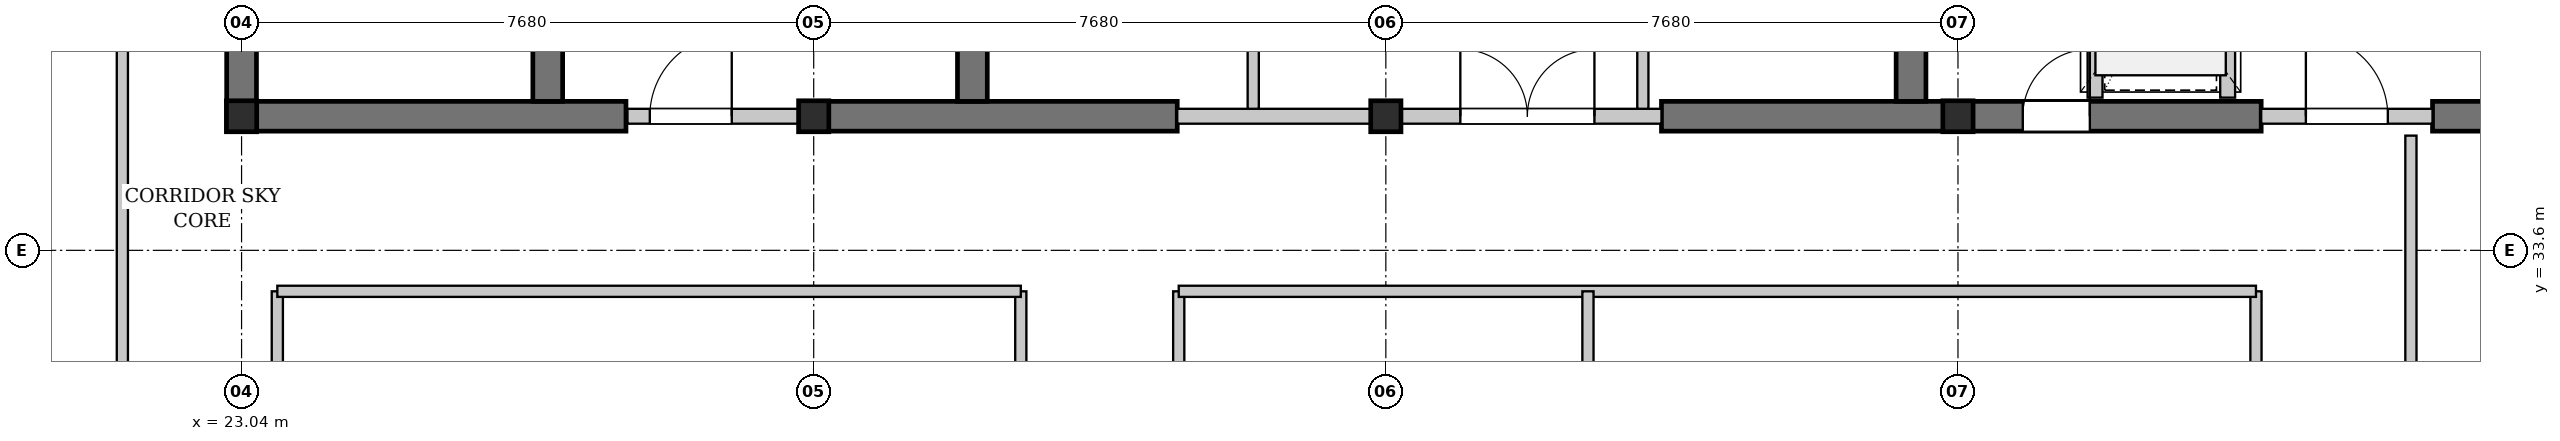
"""IFC4 building model, lengths in metres.
Left out: names, types, materials, properties, quantities, classifications, styles, units other than length and angle.
Written with IfcOpenShell. Run it as: python <this file> out.ifc"""

import sys

from ifc_helpers import new_model, si_unit, direction, frame, frame_2d, origin, origin_2d, place, context, subcontext, project, spatial, rectangle, i_section, extrude, element, fill, save


model = new_model("IFC4")
c1 = context("Model", 3, precision=1e-05, world=origin(), true_north=direction((0.0, 1.0)))
c2 = subcontext(c1, "Body", "Model", "MODEL_VIEW")
j1 = project(units=[si_unit("LENGTHUNIT", "METRE"), si_unit("PLANEANGLEUNIT", "RADIAN")], contexts=[c1])
p1 = place(None, origin())
s1 = spatial("IfcSite", under=j1, at=p1, CompositionType="ELEMENT")
p2 = place(p1, origin())
s2 = spatial("IfcBuilding", under=s1, at=p2, CompositionType="ELEMENT")
p3 = place(p2, frame((0.0, 0.0, 282.9)))
s3 = spatial("IfcBuildingStorey", under=s2, at=p3, CompositionType="ELEMENT", Elevation=282.9)
p4 = place(p3, frame((22.84, 35.4, 0.0), z_axis=(0.0, 0.0, 1.0), x_axis=(1.0, 0.0, 0.0)))
e1 = element("IfcWall", 1, at=p4, inside=s3, PredefinedType="SHEAR", context=c2, shape_type="SweptSolid", body=[
    extrude(rectangle(XDim=5.36, YDim=0.4, at=frame_2d((2.68, 0.0))), origin(), (0.0, 0.0, 1.0), 3.18),
])
p5 = place(p3, frame((30.72, 35.4, 0.0), z_axis=(0.0, 0.0, 1.0), x_axis=(1.0, 0.0, 0.0)))
e2 = element("IfcWall", 2, at=p5, inside=s3, PredefinedType="SHEAR", context=c2, shape_type="SweptSolid", body=[
    extrude(rectangle(XDim=4.88, YDim=0.4, at=frame_2d((2.44, 0.0))), origin(), (0.0, 0.0, 1.0), 3.18),
])
p6 = place(p3, frame((42.1, 35.4, 0.0), z_axis=(0.0, 0.0, 1.0), x_axis=(1.0, 0.0, 0.0)))
e3 = element("IfcWall", 3, at=p6, inside=s3, PredefinedType="SHEAR", context=c2, shape_type="SweptSolid", body=[
    extrude(rectangle(XDim=8.05, YDim=0.4, at=frame_2d((4.025, 0.0))), origin(), (0.0, 0.0, 1.0), 3.18),
])
p7 = place(p6, frame((4.85, 0.0, 0.0)))
e4 = element("IfcOpeningElement", 4, at=p7, cuts=e3, PredefinedType="OPENING", context=c2, shape_type="SweptSolid", body=[
    extrude(rectangle(XDim=0.9, YDim=2.15, at=frame_2d((0.45, 1.075))), frame((0.0, 0.21, 0.0), z_axis=(0.0, -1.0, 0.0), x_axis=(1.0, 0.0, 0.0)), (0.0, 0.0, 1.0), 0.42),
])
p8 = place(p3, frame((52.45, 35.4, 0.0), z_axis=(0.0, 0.0, 1.0), x_axis=(1.0, 0.0, 0.0)))
e5 = element("IfcWall", 5, at=p8, inside=s3, PredefinedType="SHEAR", context=c2, shape_type="SweptSolid", body=[
    extrude(rectangle(XDim=1.51, YDim=0.4, at=frame_2d((0.755, 0.0))), origin(), (0.0, 0.0, 1.0), 3.18),
])
p9 = place(p3, frame((23.04, 35.6, 0.0), z_axis=(0.0, 0.0, 1.0), x_axis=(0.0, 1.0, 0.0)))
e6 = element("IfcWall", 6, at=p9, inside=s3, PredefinedType="SHEAR", context=c2, shape_type="SweptSolid", body=[
    extrude(rectangle(XDim=10.4, YDim=0.4, at=frame_2d((5.2, 0.0))), origin(), (0.0, 0.0, 1.0), 3.18),
])
p10 = place(p3, frame((27.15, 35.6, 0.0), z_axis=(0.0, 0.0, 1.0), x_axis=(0.0, 1.0, 0.0)))
e7 = element("IfcWall", 7, at=p10, inside=s3, PredefinedType="SHEAR", context=c2, shape_type="SweptSolid", body=[
    extrude(rectangle(XDim=10.4, YDim=0.4, at=frame_2d((5.2, 0.0))), origin(), (0.0, 0.0, 1.0), 3.18),
])
p11 = place(p10, frame((0.7, 0.0, 0.0)))
e8 = element("IfcOpeningElement", 8, at=p11, cuts=e7, PredefinedType="OPENING", context=c2, shape_type="SweptSolid", body=[
    extrude(rectangle(XDim=1.1, YDim=2.15, at=frame_2d((0.55, 1.075))), frame((0.0, 0.21, 0.0), z_axis=(0.0, -1.0, 0.0), x_axis=(1.0, 0.0, 0.0)), (0.0, 0.0, 1.0), 0.42),
])
for number, where, z_axis, x_axis in (
    (9, (32.85, 35.6, 0.0), (0.0, 0.0, 1.0), (0.0, 1.0, 0.0)),
    (10, (45.45, 35.6, 0.0), (0.0, 0.0, 1.0), (0.0, 1.0, 0.0)),
):
    element("IfcWall", number, at=place(p3, frame(where, z_axis=z_axis, x_axis=x_axis)), inside=s3, PredefinedType="SHEAR", context=c2, shape_type="SweptSolid", body=[
        extrude(rectangle(XDim=10.4, YDim=0.4, at=frame_2d((5.2, 0.0))), origin(), (0.0, 0.0, 1.0), 3.18),
    ])
for number, where, z_axis, x_axis in (
    (11, (23.04, 35.4, 0.0), (0.0, 0.0, 1.0), (1.0, 0.0, 0.0)),
    (12, (30.72, 35.4, 0.0), (0.0, 0.0, 1.0), (1.0, 0.0, 0.0)),
    (13, (38.4, 35.4, 0.0), (0.0, 0.0, 1.0), (1.0, 0.0, 0.0)),
    (14, (46.08, 35.4, 0.0), (0.0, 0.0, 1.0), (1.0, 0.0, 0.0)),
):
    element("IfcColumn", number, at=place(p3, frame(where, z_axis=z_axis, x_axis=x_axis)), inside=s3, PredefinedType="COLUMN", context=c2, shape_type="SweptSolid", body=[
        extrude(i_section(OverallWidth=0.406, OverallDepth=0.416, WebThickness=0.03, FlangeThickness=0.048, FilletRadius=0.015, at=origin_2d()), origin(), (0.0, 0.0, 1.0), 3.4),
    ])
p12 = place(p3, frame((28.22, 35.4, 0.0), z_axis=(0.0, 0.0, 1.0), x_axis=(1.0, 0.0, 0.0)))
e15 = element("IfcWall", 15, at=p12, inside=s3, PredefinedType="PARTITIONING", context=c2, shape_type="SweptSolid", body=[
    extrude(rectangle(XDim=2.5, YDim=0.2, at=frame_2d((1.25, 0.0))), origin(), (0.0, 0.0, 1.0), 2.575),
])
p13 = place(p12, frame((0.3, 0.0, 0.0)))
e16 = element("IfcOpeningElement", 16, at=p13, cuts=e15, PredefinedType="OPENING", context=c2, shape_type="SweptSolid", body=[
    extrude(rectangle(XDim=1.1, YDim=2.15, at=frame_2d((0.55, 1.075))), frame((0.0, 0.11, 0.0), z_axis=(0.0, -1.0, 0.0), x_axis=(1.0, 0.0, 0.0)), (0.0, 0.0, 1.0), 0.22),
])
p14 = place(p3, frame((35.6, 35.4, 0.0), z_axis=(0.0, 0.0, 1.0), x_axis=(1.0, 0.0, 0.0)))
e17 = element("IfcWall", 17, at=p14, inside=s3, PredefinedType="PARTITIONING", context=c2, shape_type="SweptSolid", body=[
    extrude(rectangle(XDim=6.5, YDim=0.2, at=frame_2d((3.25, 0.0))), origin(), (0.0, 0.0, 1.0), 2.575),
])
p15 = place(p14, frame((3.8, 0.0, 0.0)))
e18 = element("IfcOpeningElement", 18, at=p15, cuts=e17, PredefinedType="OPENING", context=c2, shape_type="SweptSolid", body=[
    extrude(rectangle(XDim=1.8, YDim=2.3, at=frame_2d((0.9, 1.15))), frame((0.0, 0.11, 0.0), z_axis=(0.0, -1.0, 0.0), x_axis=(1.0, 0.0, 0.0)), (0.0, 0.0, 1.0), 0.22),
])
p16 = place(p3, frame((36.62, 35.5, 0.0), z_axis=(0.0, 0.0, 1.0), x_axis=(0.0, 1.0, 0.0)))
e19 = element("IfcWall", 19, at=p16, inside=s3, PredefinedType="PARTITIONING", context=c2, shape_type="SweptSolid", body=[
    extrude(rectangle(XDim=10.42, YDim=0.15, at=frame_2d((5.21, 0.0))), origin(), (0.0, 0.0, 1.0), 3.18),
])
p17 = place(p16, frame((3.92, 0.0, 0.0)))
e20 = element("IfcOpeningElement", 20, at=p17, cuts=e19, PredefinedType="OPENING", context=c2, shape_type="SweptSolid", body=[
    extrude(rectangle(XDim=0.9, YDim=2.15, at=frame_2d((0.45, 1.075))), frame((0.0, 0.085, 0.0), z_axis=(0.0, -1.0, 0.0), x_axis=(1.0, 0.0, 0.0)), (0.0, 0.0, 1.0), 0.17),
])
p18 = place(p16, frame((5.85, 0.0, 0.0)))
e21 = element("IfcOpeningElement", 21, at=p18, cuts=e19, PredefinedType="OPENING", context=c2, shape_type="SweptSolid", body=[
    extrude(rectangle(XDim=0.9, YDim=2.15, at=frame_2d((0.45, 1.075))), frame((0.0, 0.085, 0.0), z_axis=(0.0, -1.0, 0.0), x_axis=(1.0, 0.0, 0.0)), (0.0, 0.0, 1.0), 0.17),
])
p19 = place(p3, frame((41.85, 35.5, 0.0), z_axis=(0.0, 0.0, 1.0), x_axis=(0.0, 1.0, 0.0)))
e22 = element("IfcWall", 22, at=p19, inside=s3, PredefinedType="PARTITIONING", context=c2, shape_type="SweptSolid", body=[
    extrude(rectangle(XDim=10.42, YDim=0.15, at=frame_2d((5.21, 0.0))), origin(), (0.0, 0.0, 1.0), 3.18),
])
p20 = place(p19, frame((3.92, 0.0, 0.0)))
e23 = element("IfcOpeningElement", 23, at=p20, cuts=e22, PredefinedType="OPENING", context=c2, shape_type="SweptSolid", body=[
    extrude(rectangle(XDim=0.9, YDim=2.15, at=frame_2d((0.45, 1.075))), frame((0.0, 0.085, 0.0), z_axis=(0.0, -1.0, 0.0), x_axis=(1.0, 0.0, 0.0)), (0.0, 0.0, 1.0), 0.17),
])
p21 = place(p19, frame((5.85, 0.0, 0.0)))
e24 = element("IfcOpeningElement", 24, at=p21, cuts=e22, PredefinedType="OPENING", context=c2, shape_type="SweptSolid", body=[
    extrude(rectangle(XDim=0.9, YDim=2.15, at=frame_2d((0.45, 1.075))), frame((0.0, 0.085, 0.0), z_axis=(0.0, -1.0, 0.0), x_axis=(1.0, 0.0, 0.0)), (0.0, 0.0, 1.0), 0.17),
])
p22 = place(p3, frame((50.15, 35.4, 0.0), z_axis=(0.0, 0.0, 1.0), x_axis=(1.0, 0.0, 0.0)))
e25 = element("IfcWall", 25, at=p22, inside=s3, PredefinedType="PARTITIONING", context=c2, shape_type="SweptSolid", body=[
    extrude(rectangle(XDim=2.3, YDim=0.2, at=frame_2d((1.15, 0.0))), origin(), (0.0, 0.0, 1.0), 2.575),
])
p23 = place(p22, frame((0.6, 0.0, 0.0)))
e26 = element("IfcOpeningElement", 26, at=p23, cuts=e25, PredefinedType="OPENING", context=c2, shape_type="SweptSolid", body=[
    extrude(rectangle(XDim=1.1, YDim=2.15, at=frame_2d((0.55, 1.075))), frame((0.0, 0.11, 0.0), z_axis=(0.0, -1.0, 0.0), x_axis=(1.0, 0.0, 0.0)), (0.0, 0.0, 1.0), 0.22),
])
p24 = place(p3, frame((49.7, 35.65, 0.0), z_axis=(0.0, 0.0, 1.0), x_axis=(0.0, 1.0, 0.0)))
e27 = element("IfcWall", 27, at=p24, inside=s3, PredefinedType="PARTITIONING", context=c2, shape_type="SweptSolid", body=[
    extrude(rectangle(XDim=3.15, YDim=0.2, at=frame_2d((1.575, 0.0))), origin(), (0.0, 0.0, 1.0), 3.18),
])
p25 = place(p24, frame((0.85, 0.0, 0.0)))
e28 = element("IfcOpeningElement", 28, at=p25, cuts=e27, PredefinedType="OPENING", context=c2, shape_type="SweptSolid", body=[
    extrude(rectangle(XDim=1.2, YDim=2.2, at=frame_2d((0.6, 1.1))), frame((0.0, 0.11, 0.0), z_axis=(0.0, -1.0, 0.0), x_axis=(1.0, 0.0, 0.0)), (0.0, 0.0, 1.0), 0.22),
])
p26 = place(p3, frame((47.92, 35.65, 0.0), z_axis=(0.0, 0.0, 1.0), x_axis=(0.0, 1.0, 0.0)))
e29 = element("IfcWall", 29, at=p26, inside=s3, PredefinedType="PARTITIONING", context=c2, shape_type="SweptSolid", body=[
    extrude(rectangle(XDim=3.15, YDim=0.2, at=frame_2d((1.575, 0.0))), origin(), (0.0, 0.0, 1.0), 3.18),
])
p27 = place(p3, frame((21.44, 23.85, 0.0), z_axis=(0.0, 0.0, 1.0), x_axis=(0.0, 1.0, 0.0)))
e30 = element("IfcWall", 30, at=p27, inside=s3, PredefinedType="PARTITIONING", context=c2, shape_type="SweptSolid", body=[
    extrude(rectangle(XDim=25.658, YDim=0.15, at=frame_2d((12.829, 0.0))), origin(), (0.0, 0.0, 1.0), 2.575),
])
p28 = place(p27, frame((0.3, 0.0, 0.0)))
e31 = element("IfcOpeningElement", 31, at=p28, cuts=e30, PredefinedType="OPENING", context=c2, shape_type="SweptSolid", body=[
    extrude(rectangle(XDim=0.9, YDim=2.15, at=frame_2d((0.45, 1.075))), frame((0.0, 0.085, 0.0), z_axis=(0.0, -1.0, 0.0), x_axis=(1.0, 0.0, 0.0)), (0.0, 0.0, 1.0), 0.17),
])
p29 = place(p3, frame((52.16, 23.85, 0.0), z_axis=(0.0, 0.0, 1.0), x_axis=(0.0, 1.0, 0.0)))
e32 = element("IfcWall", 32, at=p29, inside=s3, PredefinedType="PARTITIONING", context=c2, shape_type="SweptSolid", body=[
    extrude(rectangle(XDim=11.29, YDim=0.15, at=frame_2d((5.645, 0.0))), origin(), (0.0, 0.0, 1.0), 3.18),
])
p30 = place(p29, frame((0.3, 0.0, 0.0)))
e33 = element("IfcOpeningElement", 33, at=p30, cuts=e32, PredefinedType="OPENING", context=c2, shape_type="SweptSolid", body=[
    extrude(rectangle(XDim=0.9, YDim=2.15, at=frame_2d((0.45, 1.075))), frame((0.0, 0.085, 0.0), z_axis=(0.0, -1.0, 0.0), x_axis=(1.0, 0.0, 0.0)), (0.0, 0.0, 1.0), 0.17),
])
for number, where, z_axis, x_axis in (
    (34, (23.52, 25.93, 0.0), (0.0, 0.0, 1.0), (0.0, 1.0, 0.0)),
    (35, (50.08, 25.93, 0.0), (0.0, 0.0, 1.0), (0.0, 1.0, 0.0)),
    (36, (33.5, 25.93, 0.0), (0.0, 0.0, 1.0), (0.0, 1.0, 0.0)),
    (37, (35.62, 25.93, 0.0), (0.0, 0.0, 1.0), (0.0, 1.0, 0.0)),
):
    element("IfcWall", number, at=place(p3, frame(where, z_axis=z_axis, x_axis=x_axis)), inside=s3, PredefinedType="PARTITIONING", context=c2, shape_type="SweptSolid", body=[
        extrude(rectangle(XDim=7.12, YDim=0.15, at=frame_2d((3.56, 0.0))), origin(), (0.0, 0.0, 1.0), 3.18),
    ])
p31 = place(p3, frame((23.52, 33.05, 0.0), z_axis=(0.0, 0.0, 1.0), x_axis=(1.0, 0.0, 0.0)))
e38 = element("IfcWall", 38, at=p31, inside=s3, PredefinedType="PARTITIONING", context=c2, shape_type="SweptSolid", body=[
    extrude(rectangle(XDim=9.98, YDim=0.15, at=frame_2d((4.99, 0.0))), origin(), (0.0, 0.0, 1.0), 3.18),
])
p32 = place(p3, frame((35.62, 33.05, 0.0), z_axis=(0.0, 0.0, 1.0), x_axis=(1.0, 0.0, 0.0)))
e39 = element("IfcWall", 39, at=p32, inside=s3, PredefinedType="PARTITIONING", context=c2, shape_type="SweptSolid", body=[
    extrude(rectangle(XDim=14.46, YDim=0.15, at=frame_2d((7.23, 0.0))), origin(), (0.0, 0.0, 1.0), 3.18),
])
p33 = place(p3, frame((41.113, 25.93, 0.0), z_axis=(0.0, 0.0, 1.0), x_axis=(0.0, 1.0, 0.0)))
e40 = element("IfcWall", 40, at=p33, inside=s3, PredefinedType="PARTITIONING", context=c2, shape_type="SweptSolid", body=[
    extrude(rectangle(XDim=7.12, YDim=0.15, at=frame_2d((3.56, 0.0))), origin(), (0.0, 0.0, 1.0), 3.18),
])
p34 = place(p13, origin())
e41 = element("IfcDoor", 41, at=p34, inside=s3, OperationType="SINGLE_SWING_RIGHT", PredefinedType="DOOR", context=c2, shape_type="SweptSolid", body=[
    extrude(rectangle(XDim=1.1, YDim=2.15, at=frame_2d((0.55, 1.075))), frame((0.0, 0.025, 0.0), z_axis=(0.0, -1.0, 0.0), x_axis=(1.0, 0.0, 0.0)), (0.0, 0.0, 1.0), 0.05),
])
fill(e16, e41)
p35 = place(p15, origin())
e42 = element("IfcDoor", 42, at=p35, inside=s3, OperationType="DOUBLE_DOOR_SINGLE_SWING", PredefinedType="DOOR", context=c2, shape_type="SweptSolid", body=[
    extrude(rectangle(XDim=1.8, YDim=2.3, at=frame_2d((0.9, 1.15))), frame((0.0, 0.025, 0.0), z_axis=(0.0, -1.0, 0.0), x_axis=(1.0, 0.0, 0.0)), (0.0, 0.0, 1.0), 0.05),
])
fill(e18, e42)
p36 = place(p23, origin())
e43 = element("IfcDoor", 43, at=p36, inside=s3, OperationType="SINGLE_SWING_LEFT", PredefinedType="DOOR", context=c2, shape_type="SweptSolid", body=[
    extrude(rectangle(XDim=1.1, YDim=2.15, at=frame_2d((0.55, 1.075))), frame((0.0, 0.025, 0.0), z_axis=(0.0, -1.0, 0.0), x_axis=(1.0, 0.0, 0.0)), (0.0, 0.0, 1.0), 0.05),
])
fill(e26, e43)
p37 = place(p7, origin())
e44 = element("IfcDoor", 44, at=p37, inside=s3, OperationType="SINGLE_SWING_RIGHT", PredefinedType="DOOR", context=c2, shape_type="SweptSolid", body=[
    extrude(rectangle(XDim=0.9, YDim=2.15, at=frame_2d((0.45, 1.075))), frame((0.0, 0.025, 0.0), z_axis=(0.0, -1.0, 0.0), x_axis=(1.0, 0.0, 0.0)), (0.0, 0.0, 1.0), 0.05),
])
fill(e4, e44)
save(model, sys.argv[1])
